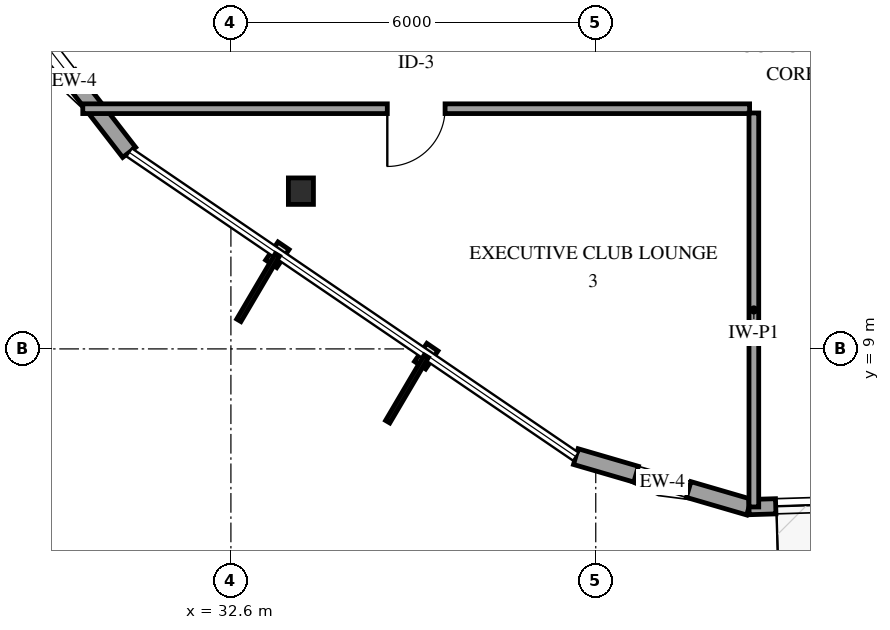
"""IFC4 building model, lengths in metres.
Left out: names, types, materials, properties, quantities, classifications, styles, units other than length and angle.
Written with IfcOpenShell. Run it as: python <this file> out.ifc"""

import sys

from ifc_helpers import new_model, si_unit, direction, frame, frame_2d, origin, origin_2d, place, context, subcontext, project, spatial, rectangle, i_section, extrude, element, fill, save


model = new_model("IFC4")
c1 = context("Model", 3, precision=1e-05, world=origin(), true_north=direction((0.0, 1.0)))
c2 = subcontext(c1, "Body", "Model", "MODEL_VIEW")
j1 = project(units=[si_unit("LENGTHUNIT", "METRE"), si_unit("PLANEANGLEUNIT", "RADIAN")], contexts=[c1])
p1 = place(None, origin())
s1 = spatial("IfcSite", under=j1, at=p1, CompositionType="ELEMENT")
p2 = place(p1, origin())
s2 = spatial("IfcBuilding", under=s1, at=p2, CompositionType="ELEMENT")
p3 = place(p2, frame((0.0, 0.0, 171.4)))
s3 = spatial("IfcBuildingStorey", under=s2, at=p3, CompositionType="ELEMENT", Elevation=171.4)
p4 = place(p3, frame((33.751, 11.594, 0.0), z_axis=(0.0, 0.0, 1.0), x_axis=(1.0, 0.0, 0.0)))
e1 = element("IfcColumn", 1, at=p4, inside=s3, PredefinedType="COLUMN", context=c2, shape_type="SweptSolid", body=[
    extrude(i_section(OverallWidth=0.412, OverallDepth=0.435, WebThickness=0.036, FlangeThickness=0.057, FilletRadius=0.038, at=origin_2d()), origin(), (0.0, 0.0, 1.0), 3.6),
])
p5 = place(p3, frame((29.111, 14.578, 0.0), z_axis=(0.0, 0.0, 1.0), x_axis=(0.612110117852, -0.790772535956, 0.0)))
e2 = element("IfcWall", 2, at=p5, inside=s3, PredefinedType="SOLIDWALL", context=c2, shape_type="SweptSolid", body=[
    extrude(rectangle(XDim=2.967, YDim=0.27, at=frame_2d((1.483, 0.0))), origin(), (0.0, 0.0, 1.0), 2.679),
])
p6 = place(p5, frame((0.45, 0.0, 0.75)))
e3 = element("IfcOpeningElement", 3, at=p6, cuts=e2, PredefinedType="OPENING", context=c2, shape_type="SweptSolid", body=[
    extrude(rectangle(XDim=0.9, YDim=1.5, at=frame_2d((0.45, 0.75))), frame((0.0, 0.145, 0.0), z_axis=(0.0, -1.0, 0.0), x_axis=(1.0, 0.0, 0.0)), (0.0, 0.0, 1.0), 0.29),
])
p7 = place(p3, frame((38.272, 7.229, 0.0), z_axis=(0.0, 0.0, 1.0), x_axis=(0.96000645191, -0.279977878217, 0.0)))
e4 = element("IfcWall", 4, at=p7, inside=s3, PredefinedType="SOLIDWALL", context=c2, shape_type="SweptSolid", body=[
    extrude(rectangle(XDim=2.967, YDim=0.27, at=frame_2d((1.483, 0.0))), origin(), (0.0, 0.0, 1.0), 2.679),
])
p8 = place(p7, frame((1.033, 0.0, 0.75)))
e5 = element("IfcOpeningElement", 5, at=p8, cuts=e4, PredefinedType="OPENING", context=c2, shape_type="SweptSolid", body=[
    extrude(rectangle(XDim=0.9, YDim=1.5, at=frame_2d((0.45, 0.75))), frame((0.0, 0.145, 0.0), z_axis=(0.0, -1.0, 0.0), x_axis=(1.0, 0.0, 0.0)), (0.0, 0.0, 1.0), 0.29),
])
p9 = place(p3, frame((41.12, 6.398, 0.0), z_axis=(0.0, 0.0, 1.0), x_axis=(0.999539110065, 0.030357329429, 0.0)))
e6 = element("IfcWall", 6, at=p9, inside=s3, PredefinedType="SOLIDWALL", context=c2, shape_type="SweptSolid", body=[
    extrude(rectangle(XDim=8.887, YDim=0.25, at=frame_2d((4.443, 0.0))), origin(), (0.0, 0.0, 1.0), 2.679),
])
p10 = place(p9, frame((3.943, 0.0, 0.0)))
e7 = element("IfcOpeningElement", 7, at=p10, cuts=e6, PredefinedType="OPENING", context=c2, shape_type="SweptSolid", body=[
    extrude(rectangle(XDim=1.0, YDim=2.15, at=frame_2d((0.5, 1.075))), frame((0.0, 0.135, 0.0), z_axis=(0.0, -1.0, 0.0), x_axis=(1.0, 0.0, 0.0)), (0.0, 0.0, 1.0), 0.27),
])
p11 = place(p9, frame((0.44, 0.0, 0.72)))
e8 = element("IfcOpeningElement", 8, at=p11, cuts=e6, PredefinedType="OPENING", context=c2, shape_type="SweptSolid", body=[
    extrude(rectangle(XDim=1.05, YDim=1.55, at=frame_2d((0.525, 0.775))), frame((0.0, 0.135, 0.0), z_axis=(0.0, -1.0, 0.0), x_axis=(1.0, 0.0, 0.0)), (0.0, 0.0, 1.0), 0.27),
])
p12 = place(p9, frame((5.583, 0.0, 0.72)))
e9 = element("IfcOpeningElement", 9, at=p12, cuts=e6, PredefinedType="OPENING", context=c2, shape_type="SweptSolid", body=[
    extrude(rectangle(XDim=1.05, YDim=1.55, at=frame_2d((0.525, 0.775))), frame((0.0, 0.135, 0.0), z_axis=(0.0, -1.0, 0.0), x_axis=(1.0, 0.0, 0.0)), (0.0, 0.0, 1.0), 0.27),
])
p13 = place(p3, frame((41.13, 12.95, 0.0), z_axis=(0.0, 0.0, 1.0), x_axis=(-1.0, 0.0, 0.0)))
e10 = element("IfcWall", 10, at=p13, inside=s3, PredefinedType="PARTITIONING", context=c2, shape_type="SweptSolid", body=[
    extrude(rectangle(XDim=10.966, YDim=0.16, at=frame_2d((5.483, 0.0))), origin(), (0.0, 0.0, 1.0), 3.3),
])
p14 = place(p13, frame((5.008, 0.0, 0.0)))
e11 = element("IfcOpeningElement", 11, at=p14, cuts=e10, PredefinedType="OPENING", context=c2, shape_type="SweptSolid", body=[
    extrude(rectangle(XDim=0.95, YDim=2.15, at=frame_2d((0.475, 1.075))), frame((0.0, 0.09, 0.0), z_axis=(0.0, -1.0, 0.0), x_axis=(1.0, 0.0, 0.0)), (0.0, 0.0, 1.0), 0.18),
])
p15 = place(p3, frame((41.2, 6.401, 0.0), z_axis=(0.0, 0.0, 1.0), x_axis=(0.0, 1.0, 0.0)))
e12 = element("IfcWall", 12, at=p15, inside=s3, PredefinedType="PARTITIONING", context=c2, shape_type="SweptSolid", body=[
    extrude(rectangle(XDim=6.479, YDim=0.16, at=frame_2d((3.24, 0.0))), origin(), (0.0, 0.0, 1.0), 2.678),
])
p16 = place(p6, origin())
e13 = element("IfcWindow", 13, at=p16, inside=s3, PartitioningType="SINGLE_PANEL", PredefinedType="WINDOW", context=c2, shape_type="SweptSolid", body=[
    extrude(rectangle(XDim=0.9, YDim=1.5, at=frame_2d((0.45, 0.75))), frame((0.0, 0.03, 0.0), z_axis=(0.0, -1.0, 0.0), x_axis=(1.0, 0.0, 0.0)), (0.0, 0.0, 1.0), 0.06),
])
fill(e3, e13)
p17 = place(p8, origin())
e14 = element("IfcWindow", 14, at=p17, inside=s3, PartitioningType="SINGLE_PANEL", PredefinedType="WINDOW", context=c2, shape_type="SweptSolid", body=[
    extrude(rectangle(XDim=0.9, YDim=1.5, at=frame_2d((0.45, 0.75))), frame((0.0, 0.03, 0.0), z_axis=(0.0, -1.0, 0.0), x_axis=(1.0, 0.0, 0.0)), (0.0, 0.0, 1.0), 0.06),
])
fill(e5, e14)
p18 = place(p11, origin())
e15 = element("IfcWindow", 15, at=p18, inside=s3, PartitioningType="SINGLE_PANEL", PredefinedType="WINDOW", context=c2, shape_type="SweptSolid", body=[
    extrude(rectangle(XDim=1.05, YDim=1.55, at=frame_2d((0.525, 0.775))), frame((0.0, 0.03, 0.0), z_axis=(0.0, -1.0, 0.0), x_axis=(1.0, 0.0, 0.0)), (0.0, 0.0, 1.0), 0.06),
])
fill(e8, e15)
p19 = place(p14, origin())
e16 = element("IfcDoor", 16, at=p19, inside=s3, OperationType="SINGLE_SWING_RIGHT", PredefinedType="DOOR", context=c2, shape_type="SweptSolid", body=[
    extrude(rectangle(XDim=0.95, YDim=2.15, at=frame_2d((0.475, 1.075))), frame((0.0, 0.025, 0.0), z_axis=(0.0, -1.0, 0.0), x_axis=(1.0, 0.0, 0.0)), (0.0, 0.0, 1.0), 0.05),
])
fill(e11, e16)
save(model, sys.argv[1])
